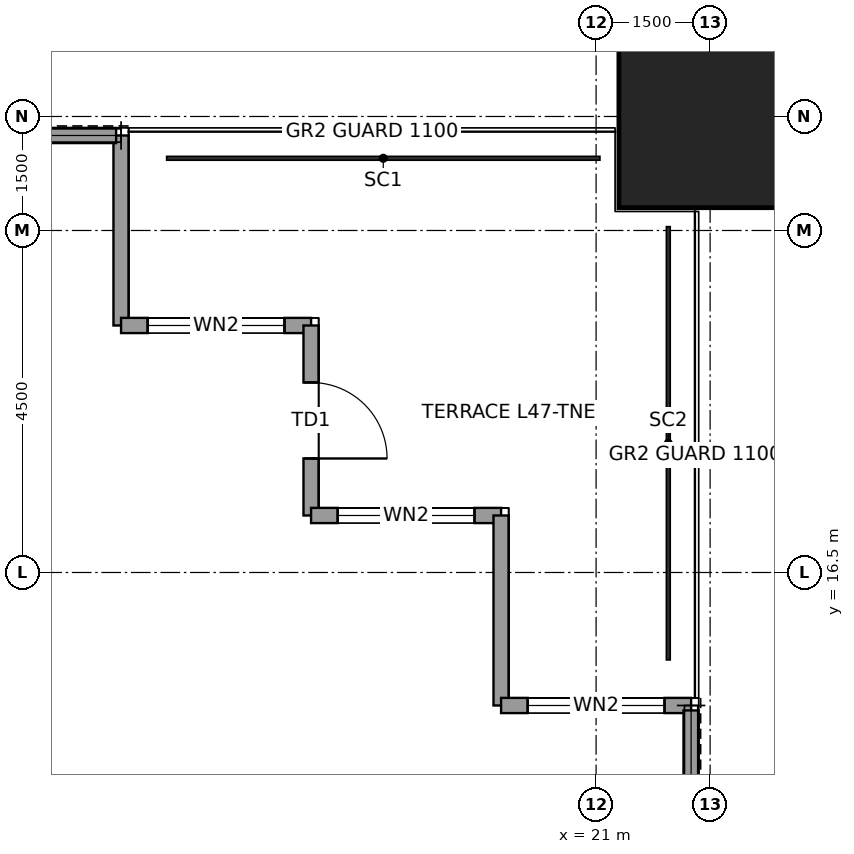
"""IFC4 building model, lengths in metres.
Left out: names, types, materials, properties, quantities, classifications, styles, units other than length and angle.
Written with IfcOpenShell. Run it as: python <this file> out.ifc"""

import sys

from ifc_helpers import new_model, si_unit, direction, frame, frame_2d, origin, origin_2d, place, context, subcontext, project, spatial, rectangle, hollow_rectangle, extrude, element, fill, save


model = new_model("IFC4")
c1 = context("Model", 3, precision=1e-05, world=origin(), true_north=direction((0.0, 1.0)))
c2 = subcontext(c1, "Body", "Model", "MODEL_VIEW")
j1 = project(units=[si_unit("LENGTHUNIT", "METRE"), si_unit("PLANEANGLEUNIT", "RADIAN")], contexts=[c1])
p1 = place(None, origin())
s1 = spatial("IfcSite", under=j1, at=p1, CompositionType="ELEMENT")
p2 = place(p1, origin())
s2 = spatial("IfcBuilding", under=s1, at=p2, CompositionType="ELEMENT")
p3 = place(p2, frame((0.0, 0.0, 221.9)))
s3 = spatial("IfcBuildingStorey", under=s2, at=p3, CompositionType="ELEMENT", Elevation=221.9)
p4 = place(p3, frame((22.5, 22.5, 0.0), z_axis=(0.0, 0.0, 1.0), x_axis=(1.0, 0.0, 0.0)))
e1 = element("IfcColumn", 1, at=p4, inside=s3, PredefinedType="COLUMN", context=c2, shape_type="SweptSolid", body=[
    extrude(hollow_rectangle(XDim=2.4, YDim=2.4, WallThickness=0.12, at=origin_2d()), origin(), (0.0, 0.0, 1.0), 4.0),
])
p5 = place(p3, frame((14.75, 22.25, 0.0), z_axis=(0.0, 0.0, 1.0), x_axis=(0.0, -1.0, 0.0)))
e2 = element("IfcWall", 2, at=p5, inside=s3, PredefinedType="SOLIDWALL", context=c2, shape_type="SweptSolid", body=[
    extrude(rectangle(XDim=2.5, YDim=0.2, at=frame_2d((1.25, 0.0))), origin(), (0.0, 0.0, 1.0), 3.85),
])
p6 = place(p3, frame((14.75, 19.75, 0.0), z_axis=(0.0, 0.0, 1.0), x_axis=(1.0, 0.0, 0.0)))
e3 = element("IfcWall", 3, at=p6, inside=s3, PredefinedType="SOLIDWALL", context=c2, shape_type="SweptSolid", body=[
    extrude(rectangle(XDim=2.5, YDim=0.2, at=frame_2d((1.25, 0.0))), origin(), (0.0, 0.0, 1.0), 3.85),
])
p7 = place(p6, frame((0.35, 0.0, 0.3)))
e4 = element("IfcOpeningElement", 4, at=p7, cuts=e3, PredefinedType="OPENING", context=c2, shape_type="SweptSolid", body=[
    extrude(rectangle(XDim=1.8, YDim=2.4, at=frame_2d((0.9, 1.2))), frame((0.0, 0.11, 0.0), z_axis=(0.0, -1.0, 0.0), x_axis=(1.0, 0.0, 0.0)), (0.0, 0.0, 1.0), 0.22),
])
p8 = place(p3, frame((17.25, 19.75, 0.0), z_axis=(0.0, 0.0, 1.0), x_axis=(0.0, -1.0, 0.0)))
e5 = element("IfcWall", 5, at=p8, inside=s3, PredefinedType="SOLIDWALL", context=c2, shape_type="SweptSolid", body=[
    extrude(rectangle(XDim=2.5, YDim=0.2, at=frame_2d((1.25, 0.0))), origin(), (0.0, 0.0, 1.0), 3.85),
])
p9 = place(p8, frame((0.75, 0.0, 0.0)))
e6 = element("IfcOpeningElement", 6, at=p9, cuts=e5, PredefinedType="OPENING", context=c2, shape_type="SweptSolid", body=[
    extrude(rectangle(XDim=1.0, YDim=2.4, at=frame_2d((0.5, 1.2))), frame((0.0, 0.11, 0.0), z_axis=(0.0, -1.0, 0.0), x_axis=(1.0, 0.0, 0.0)), (0.0, 0.0, 1.0), 0.22),
])
p10 = place(p3, frame((17.25, 17.25, 0.0), z_axis=(0.0, 0.0, 1.0), x_axis=(1.0, 0.0, 0.0)))
e7 = element("IfcWall", 7, at=p10, inside=s3, PredefinedType="SOLIDWALL", context=c2, shape_type="SweptSolid", body=[
    extrude(rectangle(XDim=2.5, YDim=0.2, at=frame_2d((1.25, 0.0))), origin(), (0.0, 0.0, 1.0), 3.85),
])
p11 = place(p10, frame((0.35, 0.0, 0.3)))
e8 = element("IfcOpeningElement", 8, at=p11, cuts=e7, PredefinedType="OPENING", context=c2, shape_type="SweptSolid", body=[
    extrude(rectangle(XDim=1.8, YDim=2.4, at=frame_2d((0.9, 1.2))), frame((0.0, 0.11, 0.0), z_axis=(0.0, -1.0, 0.0), x_axis=(1.0, 0.0, 0.0)), (0.0, 0.0, 1.0), 0.22),
])
p12 = place(p3, frame((19.75, 17.25, 0.0), z_axis=(0.0, 0.0, 1.0), x_axis=(0.0, -1.0, 0.0)))
e9 = element("IfcWall", 9, at=p12, inside=s3, PredefinedType="SOLIDWALL", context=c2, shape_type="SweptSolid", body=[
    extrude(rectangle(XDim=2.5, YDim=0.2, at=frame_2d((1.25, 0.0))), origin(), (0.0, 0.0, 1.0), 3.85),
])
p13 = place(p3, frame((19.75, 14.75, 0.0), z_axis=(0.0, 0.0, 1.0), x_axis=(1.0, 0.0, 0.0)))
e10 = element("IfcWall", 10, at=p13, inside=s3, PredefinedType="SOLIDWALL", context=c2, shape_type="SweptSolid", body=[
    extrude(rectangle(XDim=2.5, YDim=0.2, at=frame_2d((1.25, 0.0))), origin(), (0.0, 0.0, 1.0), 3.85),
])
p14 = place(p13, frame((0.35, 0.0, 0.3)))
e11 = element("IfcOpeningElement", 11, at=p14, cuts=e10, PredefinedType="OPENING", context=c2, shape_type="SweptSolid", body=[
    extrude(rectangle(XDim=1.8, YDim=2.4, at=frame_2d((0.9, 1.2))), frame((0.0, 0.11, 0.0), z_axis=(0.0, -1.0, 0.0), x_axis=(1.0, 0.0, 0.0)), (0.0, 0.0, 1.0), 0.22),
])
for number, where, z_axis, x_axis in (
    (12, (12.366, 22.25, 0.0), (0.0, 0.0, 1.0), (1.0, 0.0, 0.0)),
    (13, (22.25, 14.685, 0.0), (0.0, 0.0, 1.0), (0.0, -1.0, 0.0)),
):
    element("IfcWall", number, at=place(p3, frame(where, z_axis=z_axis, x_axis=x_axis)), inside=s3, PredefinedType="SOLIDWALL", context=c2, shape_type="SweptSolid", body=[
        extrude(rectangle(XDim=2.319, YDim=0.2, at=frame_2d((1.16, 0.0))), origin(), (0.0, 0.0, 1.0), 3.85),
    ])
p15 = place(p7, origin())
e14 = element("IfcWindow", 14, at=p15, inside=s3, PartitioningType="SINGLE_PANEL", PredefinedType="WINDOW", context=c2, shape_type="SweptSolid", body=[
    extrude(rectangle(XDim=1.8, YDim=2.4, at=frame_2d((0.9, 1.2))), frame((0.0, 0.03, 0.0), z_axis=(0.0, -1.0, 0.0), x_axis=(1.0, 0.0, 0.0)), (0.0, 0.0, 1.0), 0.06),
])
fill(e4, e14)
p16 = place(p9, origin())
e15 = element("IfcDoor", 15, at=p16, inside=s3, OperationType="SINGLE_SWING_RIGHT", PredefinedType="DOOR", context=c2, shape_type="SweptSolid", body=[
    extrude(rectangle(XDim=1.0, YDim=2.4, at=frame_2d((0.5, 1.2))), frame((0.0, 0.025, 0.0), z_axis=(0.0, -1.0, 0.0), x_axis=(1.0, 0.0, 0.0)), (0.0, 0.0, 1.0), 0.05),
])
fill(e6, e15)
p17 = place(p11, origin())
e16 = element("IfcWindow", 16, at=p17, inside=s3, PartitioningType="SINGLE_PANEL", PredefinedType="WINDOW", context=c2, shape_type="SweptSolid", body=[
    extrude(rectangle(XDim=1.8, YDim=2.4, at=frame_2d((0.9, 1.2))), frame((0.0, 0.03, 0.0), z_axis=(0.0, -1.0, 0.0), x_axis=(1.0, 0.0, 0.0)), (0.0, 0.0, 1.0), 0.06),
])
fill(e8, e16)
p18 = place(p14, origin())
e17 = element("IfcWindow", 17, at=p18, inside=s3, PartitioningType="SINGLE_PANEL", PredefinedType="WINDOW", context=c2, shape_type="SweptSolid", body=[
    extrude(rectangle(XDim=1.8, YDim=2.4, at=frame_2d((0.9, 1.2))), frame((0.0, 0.03, 0.0), z_axis=(0.0, -1.0, 0.0), x_axis=(1.0, 0.0, 0.0)), (0.0, 0.0, 1.0), 0.06),
])
fill(e11, e17)
save(model, sys.argv[1])
